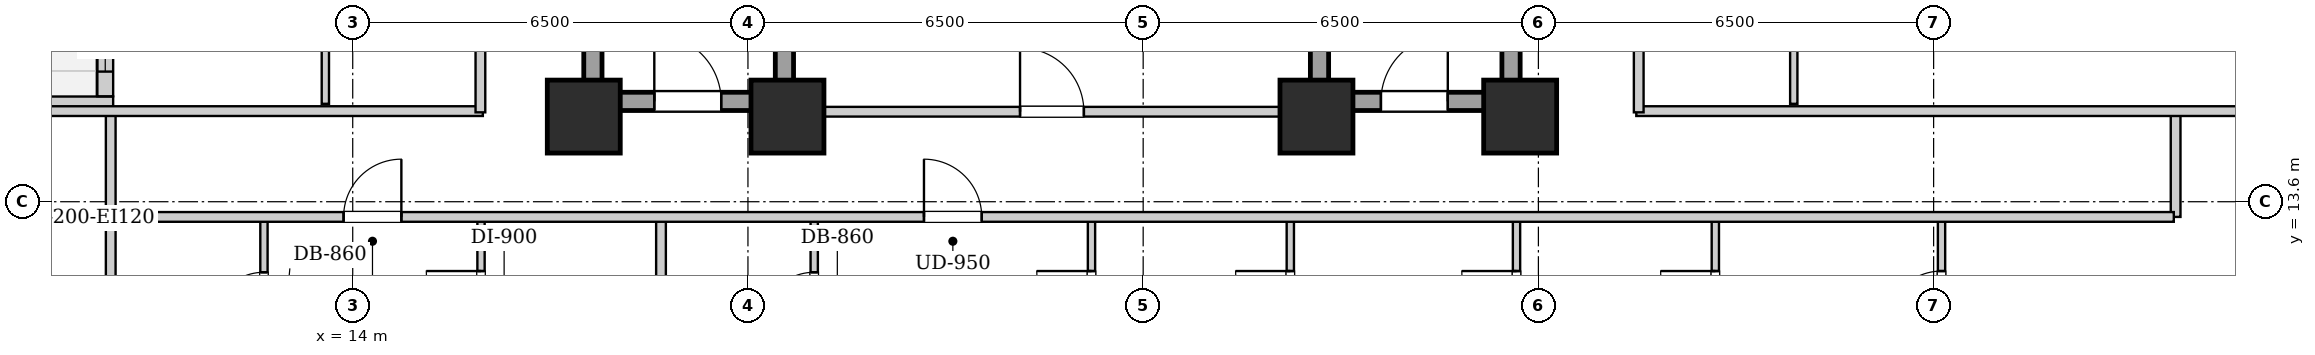
"""IFC4 building model, lengths in metres.
Left out: names, types, materials, properties, quantities, classifications, styles, units other than length and angle.
Written with IfcOpenShell. Run it as: python <this file> out.ifc"""

import sys

from ifc_helpers import new_model, si_unit, direction, frame, frame_2d, origin, origin_2d, place, context, subcontext, project, spatial, rectangle, extrude, element, fill, save


model = new_model("IFC4")
c1 = context("Model", 3, precision=1e-05, world=origin(), true_north=direction((0.0, 1.0)))
c2 = subcontext(c1, "Body", "Model", "MODEL_VIEW")
j1 = project(units=[si_unit("LENGTHUNIT", "METRE"), si_unit("PLANEANGLEUNIT", "RADIAN")], contexts=[c1])
p1 = place(None, origin())
s1 = spatial("IfcSite", under=j1, at=p1, CompositionType="ELEMENT")
p2 = place(p1, origin())
s2 = spatial("IfcBuilding", under=s1, at=p2, CompositionType="ELEMENT")
p3 = place(p2, frame((0.0, 0.0, 45.0)))
s3 = spatial("IfcBuildingStorey", under=s2, at=p3, CompositionType="ELEMENT", Elevation=45.0)
for number, where, z_axis, x_axis in (
    (1, (17.8, 15.0, 0.0), (0.0, 0.0, 1.0), (1.0, 0.0, 0.0)),
    (2, (21.15, 15.0, 0.0), (0.0, 0.0, 1.0), (1.0, 0.0, 0.0)),
    (3, (29.85, 15.0, 0.0), (0.0, 0.0, 1.0), (1.0, 0.0, 0.0)),
    (4, (33.2, 15.0, 0.0), (0.0, 0.0, 1.0), (1.0, 0.0, 0.0)),
):
    element("IfcColumn", number, at=place(p3, frame(where, z_axis=z_axis, x_axis=x_axis)), inside=s3, PredefinedType="COLUMN", context=c2, shape_type="SweptSolid", body=[
        extrude(rectangle(XDim=1.2, YDim=1.2, at=origin_2d()), origin(), (0.0, 0.0, 1.0), 3.2),
    ])
p4 = place(p3, frame((7.66, 15.2, 0.0), z_axis=(0.0, 0.0, 1.0), x_axis=(1.0, 0.0, 0.0)))
e5 = element("IfcWall", 5, at=p4, inside=s3, PredefinedType="SOLIDWALL", context=c2, shape_type="SweptSolid", body=[
    extrude(rectangle(XDim=2.4, YDim=0.26, at=frame_2d((1.2, 0.0))), origin(), (0.0, 0.0, 1.0), 2.94),
])
p5 = place(p3, frame((9.93, 15.334, 0.0), z_axis=(0.0, 0.0, 1.0), x_axis=(0.0, 1.0, 0.0)))
e6 = element("IfcWall", 6, at=p5, inside=s3, PredefinedType="SOLIDWALL", context=c2, shape_type="SweptSolid", body=[
    extrude(rectangle(XDim=3.932, YDim=0.26, at=frame_2d((1.966, 0.0))), origin(), (0.0, 0.0, 1.0), 2.94),
])
p6 = place(p5, frame((1.416, 0.0, 0.0)))
e7 = element("IfcOpeningElement", 7, at=p6, cuts=e6, PredefinedType="OPENING", context=c2, shape_type="SweptSolid", body=[
    extrude(rectangle(XDim=1.1, YDim=2.0, at=frame_2d((0.55, 1.0))), frame((0.0, 0.14, 0.0), z_axis=(0.0, -1.0, 0.0), x_axis=(1.0, 0.0, 0.0)), (0.0, 0.0, 1.0), 0.28),
])
p7 = place(p5, frame((0.406, 0.0, 0.55)))
e8 = element("IfcOpeningElement", 8, at=p7, cuts=e6, PredefinedType="OPENING", context=c2, shape_type="SweptSolid", body=[
    extrude(rectangle(XDim=0.85, YDim=1.2, at=frame_2d((0.425, 0.6))), frame((0.0, 0.14, 0.0), z_axis=(0.0, -1.0, 0.0), x_axis=(1.0, 0.0, 0.0)), (0.0, 0.0, 1.0), 0.28),
])
for number, where, z_axis, x_axis in (
    (9, (17.95, 15.1, 0.0), (0.0, 0.0, 1.0), (0.0, 1.0, 0.0)),
    (10, (21.1, 15.1, 0.0), (0.0, 0.0, 1.0), (0.0, 1.0, 0.0)),
):
    element("IfcWall", number, at=place(p3, frame(where, z_axis=z_axis, x_axis=x_axis)), inside=s3, PredefinedType="SHEAR", context=c2, shape_type="SweptSolid", body=[
        extrude(rectangle(XDim=9.0, YDim=0.3, at=frame_2d((4.5, 0.0))), origin(), (0.0, 0.0, 1.0), 2.94),
    ])
p8 = place(p3, frame((18.1, 15.25, 0.0), z_axis=(0.0, 0.0, 1.0), x_axis=(1.0, 0.0, 0.0)))
e11 = element("IfcWall", 11, at=p8, inside=s3, PredefinedType="SHEAR", context=c2, shape_type="SweptSolid", body=[
    extrude(rectangle(XDim=2.85, YDim=0.3, at=frame_2d((1.425, 0.0))), origin(), (0.0, 0.0, 1.0), 2.94),
])
p9 = place(p8, frame((0.86, 0.0, 0.0)))
e12 = element("IfcOpeningElement", 12, at=p9, cuts=e11, PredefinedType="OPENING", context=c2, shape_type="SweptSolid", body=[
    extrude(rectangle(XDim=1.1, YDim=2.05, at=frame_2d((0.55, 1.025))), frame((0.0, 0.16, 0.0), z_axis=(0.0, -1.0, 0.0), x_axis=(1.0, 0.0, 0.0)), (0.0, 0.0, 1.0), 0.32),
])
for number, where, z_axis, x_axis in (
    (13, (29.9, 15.1, 0.0), (0.0, 0.0, 1.0), (0.0, 1.0, 0.0)),
    (14, (33.05, 15.1, 0.0), (0.0, 0.0, 1.0), (0.0, 1.0, 0.0)),
):
    element("IfcWall", number, at=place(p3, frame(where, z_axis=z_axis, x_axis=x_axis)), inside=s3, PredefinedType="SHEAR", context=c2, shape_type="SweptSolid", body=[
        extrude(rectangle(XDim=9.0, YDim=0.3, at=frame_2d((4.5, 0.0))), origin(), (0.0, 0.0, 1.0), 2.94),
    ])
p10 = place(p3, frame((30.05, 15.25, 0.0), z_axis=(0.0, 0.0, 1.0), x_axis=(1.0, 0.0, 0.0)))
e15 = element("IfcWall", 15, at=p10, inside=s3, PredefinedType="SHEAR", context=c2, shape_type="SweptSolid", body=[
    extrude(rectangle(XDim=2.85, YDim=0.3, at=frame_2d((1.425, 0.0))), origin(), (0.0, 0.0, 1.0), 2.94),
])
p11 = place(p10, frame((0.86, 0.0, 0.0)))
e16 = element("IfcOpeningElement", 16, at=p11, cuts=e15, PredefinedType="OPENING", context=c2, shape_type="SweptSolid", body=[
    extrude(rectangle(XDim=1.1, YDim=2.05, at=frame_2d((0.55, 1.025))), frame((0.0, 0.16, 0.0), z_axis=(0.0, -1.0, 0.0), x_axis=(1.0, 0.0, 0.0)), (0.0, 0.0, 1.0), 0.32),
])
p12 = place(p3, frame((21.25, 15.08, 0.0), z_axis=(0.0, 0.0, 1.0), x_axis=(1.0, 0.0, 0.0)))
e17 = element("IfcWall", 17, at=p12, inside=s3, PredefinedType="PARTITIONING", context=c2, shape_type="SweptSolid", body=[
    extrude(rectangle(XDim=8.5, YDim=0.16, at=frame_2d((4.25, 0.0))), origin(), (0.0, 0.0, 1.0), 2.155),
])
p13 = place(p12, frame((3.725, 0.0, 0.0)))
e18 = element("IfcOpeningElement", 18, at=p13, cuts=e17, PredefinedType="OPENING", context=c2, shape_type="SweptSolid", body=[
    extrude(rectangle(XDim=1.05, YDim=2.05, at=frame_2d((0.525, 1.025))), frame((0.0, 0.09, 0.0), z_axis=(0.0, -1.0, 0.0), x_axis=(1.0, 0.0, 0.0)), (0.0, 0.0, 1.0), 0.18),
])
for number, where, z_axis, x_axis in (
    (19, (10.02, 13.35, 0.0), (0.0, 0.0, 1.0), (0.0, 1.0, 0.0)),
    (20, (43.98, 13.35, 0.0), (0.0, 0.0, 1.0), (0.0, 1.0, 0.0)),
):
    element("IfcWall", number, at=place(p3, frame(where, z_axis=z_axis, x_axis=x_axis)), inside=s3, PredefinedType="PARTITIONING", context=c2, shape_type="SweptSolid", body=[
        extrude(rectangle(XDim=1.74, YDim=0.16, at=frame_2d((0.87, 0.0))), origin(), (0.0, 0.0, 1.0), 2.94),
    ])
p14 = place(p3, frame((7.78, 15.09, 0.0), z_axis=(0.0, 0.0, 1.0), x_axis=(1.0, 0.0, 0.0)))
e21 = element("IfcWall", 21, at=p14, inside=s3, PredefinedType="PARTITIONING", context=c2, shape_type="SweptSolid", body=[
    extrude(rectangle(XDim=8.36, YDim=0.16, at=frame_2d((4.18, 0.0))), origin(), (0.0, 0.0, 1.0), 2.155),
])
p15 = place(p3, frame((35.11, 15.09, 0.0), z_axis=(0.0, 0.0, 1.0), x_axis=(1.0, 0.0, 0.0)))
e22 = element("IfcWall", 22, at=p15, inside=s3, PredefinedType="PARTITIONING", context=c2, shape_type="SweptSolid", body=[
    extrude(rectangle(XDim=11.11, YDim=0.16, at=frame_2d((5.555, 0.0))), origin(), (0.0, 0.0, 1.0), 2.155),
])
p16 = place(p3, frame((10.02, 10.65, 0.0), z_axis=(0.0, 0.0, 1.0), x_axis=(0.0, 1.0, 0.0)))
e23 = element("IfcWall", 23, at=p16, inside=s3, PredefinedType="PARTITIONING", context=c2, shape_type="SweptSolid", body=[
    extrude(rectangle(XDim=2.66, YDim=0.16, at=frame_2d((1.33, 0.0))), origin(), (0.0, 0.0, 1.0), 2.94),
])
p17 = place(p3, frame((12.54, 10.71, 0.0), z_axis=(0.0, 0.0, 1.0), x_axis=(0.0, 1.0, 0.0)))
e24 = element("IfcWall", 24, at=p17, inside=s3, PredefinedType="PARTITIONING", context=c2, shape_type="SweptSolid", body=[
    extrude(rectangle(XDim=2.6, YDim=0.12, at=frame_2d((1.3, 0.0))), origin(), (0.0, 0.0, 1.0), 2.94),
])
p18 = place(p17, frame((0.87, 0.0, 0.0)))
e25 = element("IfcOpeningElement", 25, at=p18, cuts=e24, PredefinedType="OPENING", context=c2, shape_type="SweptSolid", body=[
    extrude(rectangle(XDim=0.86, YDim=2.05, at=frame_2d((0.43, 1.025))), frame((0.0, 0.07, 0.0), z_axis=(0.0, -1.0, 0.0), x_axis=(1.0, 0.0, 0.0)), (0.0, 0.0, 1.0), 0.14),
])
p19 = place(p3, frame((16.11, 10.71, 0.0), z_axis=(0.0, 0.0, 1.0), x_axis=(0.0, 1.0, 0.0)))
e26 = element("IfcWall", 26, at=p19, inside=s3, PredefinedType="PARTITIONING", context=c2, shape_type="SweptSolid", body=[
    extrude(rectangle(XDim=2.6, YDim=0.12, at=frame_2d((1.3, 0.0))), origin(), (0.0, 0.0, 1.0), 2.94),
])
p20 = place(p19, frame((0.85, 0.0, 0.0)))
e27 = element("IfcOpeningElement", 27, at=p20, cuts=e26, PredefinedType="OPENING", context=c2, shape_type="SweptSolid", body=[
    extrude(rectangle(XDim=0.9, YDim=2.05, at=frame_2d((0.45, 1.025))), frame((0.0, 0.07, 0.0), z_axis=(0.0, -1.0, 0.0), x_axis=(1.0, 0.0, 0.0)), (0.0, 0.0, 1.0), 0.14),
])
p21 = place(p3, frame((19.07, 0.28, 0.0), z_axis=(0.0, 0.0, 1.0), x_axis=(0.0, 1.0, 0.0)))
e28 = element("IfcWall", 28, at=p21, inside=s3, PredefinedType="PARTITIONING", context=c2, shape_type="SweptSolid", body=[
    extrude(rectangle(XDim=13.03, YDim=0.16, at=frame_2d((6.515, 0.0))), origin(), (0.0, 0.0, 1.0), 2.94),
])
p22 = place(p3, frame((21.59, 10.71, 0.0), z_axis=(0.0, 0.0, 1.0), x_axis=(0.0, 1.0, 0.0)))
e29 = element("IfcWall", 29, at=p22, inside=s3, PredefinedType="PARTITIONING", context=c2, shape_type="SweptSolid", body=[
    extrude(rectangle(XDim=2.6, YDim=0.12, at=frame_2d((1.3, 0.0))), origin(), (0.0, 0.0, 1.0), 2.94),
])
p23 = place(p22, frame((0.87, 0.0, 0.0)))
e30 = element("IfcOpeningElement", 30, at=p23, cuts=e29, PredefinedType="OPENING", context=c2, shape_type="SweptSolid", body=[
    extrude(rectangle(XDim=0.86, YDim=2.05, at=frame_2d((0.43, 1.025))), frame((0.0, 0.07, 0.0), z_axis=(0.0, -1.0, 0.0), x_axis=(1.0, 0.0, 0.0)), (0.0, 0.0, 1.0), 0.14),
])
p24 = place(p3, frame((26.15, 10.71, 0.0), z_axis=(0.0, 0.0, 1.0), x_axis=(0.0, 1.0, 0.0)))
e31 = element("IfcWall", 31, at=p24, inside=s3, PredefinedType="PARTITIONING", context=c2, shape_type="SweptSolid", body=[
    extrude(rectangle(XDim=2.6, YDim=0.12, at=frame_2d((1.3, 0.0))), origin(), (0.0, 0.0, 1.0), 2.94),
])
p25 = place(p24, frame((0.85, 0.0, 0.0)))
e32 = element("IfcOpeningElement", 32, at=p25, cuts=e31, PredefinedType="OPENING", context=c2, shape_type="SweptSolid", body=[
    extrude(rectangle(XDim=0.9, YDim=2.05, at=frame_2d((0.45, 1.025))), frame((0.0, 0.07, 0.0), z_axis=(0.0, -1.0, 0.0), x_axis=(1.0, 0.0, 0.0)), (0.0, 0.0, 1.0), 0.14),
])
p26 = place(p3, frame((29.42, 10.71, 0.0), z_axis=(0.0, 0.0, 1.0), x_axis=(0.0, 1.0, 0.0)))
e33 = element("IfcWall", 33, at=p26, inside=s3, PredefinedType="PARTITIONING", context=c2, shape_type="SweptSolid", body=[
    extrude(rectangle(XDim=2.6, YDim=0.12, at=frame_2d((1.3, 0.0))), origin(), (0.0, 0.0, 1.0), 2.94),
])
p27 = place(p26, frame((0.85, 0.0, 0.0)))
e34 = element("IfcOpeningElement", 34, at=p27, cuts=e33, PredefinedType="OPENING", context=c2, shape_type="SweptSolid", body=[
    extrude(rectangle(XDim=0.9, YDim=2.05, at=frame_2d((0.45, 1.025))), frame((0.0, 0.07, 0.0), z_axis=(0.0, -1.0, 0.0), x_axis=(1.0, 0.0, 0.0)), (0.0, 0.0, 1.0), 0.14),
])
p28 = place(p3, frame((33.14, 10.71, 0.0), z_axis=(0.0, 0.0, 1.0), x_axis=(0.0, 1.0, 0.0)))
e35 = element("IfcWall", 35, at=p28, inside=s3, PredefinedType="PARTITIONING", context=c2, shape_type="SweptSolid", body=[
    extrude(rectangle(XDim=2.6, YDim=0.12, at=frame_2d((1.3, 0.0))), origin(), (0.0, 0.0, 1.0), 2.155),
])
p29 = place(p28, frame((0.85, 0.0, 0.0)))
e36 = element("IfcOpeningElement", 36, at=p29, cuts=e35, PredefinedType="OPENING", context=c2, shape_type="SweptSolid", body=[
    extrude(rectangle(XDim=0.9, YDim=2.05, at=frame_2d((0.45, 1.025))), frame((0.0, 0.07, 0.0), z_axis=(0.0, -1.0, 0.0), x_axis=(1.0, 0.0, 0.0)), (0.0, 0.0, 1.0), 0.14),
])
p30 = place(p3, frame((36.41, 10.71, 0.0), z_axis=(0.0, 0.0, 1.0), x_axis=(0.0, 1.0, 0.0)))
e37 = element("IfcWall", 37, at=p30, inside=s3, PredefinedType="PARTITIONING", context=c2, shape_type="SweptSolid", body=[
    extrude(rectangle(XDim=2.6, YDim=0.12, at=frame_2d((1.3, 0.0))), origin(), (0.0, 0.0, 1.0), 2.94),
])
p31 = place(p30, frame((0.85, 0.0, 0.0)))
e38 = element("IfcOpeningElement", 38, at=p31, cuts=e37, PredefinedType="OPENING", context=c2, shape_type="SweptSolid", body=[
    extrude(rectangle(XDim=0.9, YDim=2.05, at=frame_2d((0.45, 1.025))), frame((0.0, 0.07, 0.0), z_axis=(0.0, -1.0, 0.0), x_axis=(1.0, 0.0, 0.0)), (0.0, 0.0, 1.0), 0.14),
])
p32 = place(p3, frame((40.13, 10.71, 0.0), z_axis=(0.0, 0.0, 1.0), x_axis=(0.0, 1.0, 0.0)))
e39 = element("IfcWall", 39, at=p32, inside=s3, PredefinedType="PARTITIONING", context=c2, shape_type="SweptSolid", body=[
    extrude(rectangle(XDim=2.6, YDim=0.12, at=frame_2d((1.3, 0.0))), origin(), (0.0, 0.0, 1.0), 2.94),
])
p33 = place(p32, frame((0.85, 0.0, 0.0)))
e40 = element("IfcOpeningElement", 40, at=p33, cuts=e39, PredefinedType="OPENING", context=c2, shape_type="SweptSolid", body=[
    extrude(rectangle(XDim=0.9, YDim=2.05, at=frame_2d((0.45, 1.025))), frame((0.0, 0.07, 0.0), z_axis=(0.0, -1.0, 0.0), x_axis=(1.0, 0.0, 0.0)), (0.0, 0.0, 1.0), 0.14),
])
p34 = place(p3, frame((13.55, 15.21, 0.0), z_axis=(0.0, 0.0, 1.0), x_axis=(0.0, 1.0, 0.0)))
e41 = element("IfcWall", 41, at=p34, inside=s3, PredefinedType="PARTITIONING", context=c2, shape_type="SweptSolid", body=[
    extrude(rectangle(XDim=1.85, YDim=0.12, at=frame_2d((0.925, 0.0))), origin(), (0.0, 0.0, 1.0), 2.94),
])
p35 = place(p3, frame((37.7, 15.21, 0.0), z_axis=(0.0, 0.0, 1.0), x_axis=(0.0, 1.0, 0.0)))
e42 = element("IfcWall", 42, at=p35, inside=s3, PredefinedType="PARTITIONING", context=c2, shape_type="SweptSolid", body=[
    extrude(rectangle(XDim=2.3, YDim=0.12, at=frame_2d((1.15, 0.0))), origin(), (0.0, 0.0, 1.0), 2.94),
])
p36 = place(p3, frame((10.05, 13.35, 0.0), z_axis=(0.0, 0.0, 1.0), x_axis=(1.0, 0.0, 0.0)))
e43 = element("IfcWall", 43, at=p36, inside=s3, PredefinedType="PARTITIONING", context=c2, shape_type="SweptSolid", body=[
    extrude(rectangle(XDim=33.9, YDim=0.16, at=frame_2d((16.95, 0.0))), origin(), (0.0, 0.0, 1.0), 2.94),
])
p37 = place(p36, frame((3.8, 0.0, 0.0)))
e44 = element("IfcOpeningElement", 44, at=p37, cuts=e43, PredefinedType="OPENING", context=c2, shape_type="SweptSolid", body=[
    extrude(rectangle(XDim=0.95, YDim=2.1, at=frame_2d((0.475, 1.05))), frame((0.0, 0.09, 0.0), z_axis=(0.0, -1.0, 0.0), x_axis=(1.0, 0.0, 0.0)), (0.0, 0.0, 1.0), 0.18),
])
p38 = place(p36, frame((13.345, 0.0, 0.0)))
e45 = element("IfcOpeningElement", 45, at=p38, cuts=e43, PredefinedType="OPENING", context=c2, shape_type="SweptSolid", body=[
    extrude(rectangle(XDim=0.95, YDim=2.1, at=frame_2d((0.475, 1.05))), frame((0.0, 0.09, 0.0), z_axis=(0.0, -1.0, 0.0), x_axis=(1.0, 0.0, 0.0)), (0.0, 0.0, 1.0), 0.18),
])
p39 = place(p3, frame((16.1, 15.07, 0.0), z_axis=(0.0, 0.0, 1.0), x_axis=(0.0, 1.0, 0.0)))
e46 = element("IfcWall", 46, at=p39, inside=s3, PredefinedType="PARTITIONING", context=c2, shape_type="SweptSolid", body=[
    extrude(rectangle(XDim=13.93, YDim=0.16, at=frame_2d((6.965, 0.0))), origin(), (0.0, 0.0, 1.0), 2.94),
])
p40 = place(p39, frame((3.608, 0.0, 0.0)))
e47 = element("IfcOpeningElement", 47, at=p40, cuts=e46, PredefinedType="OPENING", context=c2, shape_type="SweptSolid", body=[
    extrude(rectangle(XDim=0.95, YDim=2.1, at=frame_2d((0.475, 1.05))), frame((0.0, 0.09, 0.0), z_axis=(0.0, -1.0, 0.0), x_axis=(1.0, 0.0, 0.0)), (0.0, 0.0, 1.0), 0.18),
])
p41 = place(p39, frame((10.649, 0.0, 0.0)))
e48 = element("IfcOpeningElement", 48, at=p41, cuts=e46, PredefinedType="OPENING", context=c2, shape_type="SweptSolid", body=[
    extrude(rectangle(XDim=0.95, YDim=2.1, at=frame_2d((0.475, 1.05))), frame((0.0, 0.09, 0.0), z_axis=(0.0, -1.0, 0.0), x_axis=(1.0, 0.0, 0.0)), (0.0, 0.0, 1.0), 0.18),
])
p42 = place(p3, frame((35.15, 15.07, 0.0), z_axis=(0.0, 0.0, 1.0), x_axis=(0.0, 1.0, 0.0)))
e49 = element("IfcWall", 49, at=p42, inside=s3, PredefinedType="PARTITIONING", context=c2, shape_type="SweptSolid", body=[
    extrude(rectangle(XDim=13.93, YDim=0.16, at=frame_2d((6.965, 0.0))), origin(), (0.0, 0.0, 1.0), 2.94),
])
p43 = place(p42, frame((4.385, 0.0, 0.0)))
e50 = element("IfcOpeningElement", 50, at=p43, cuts=e49, PredefinedType="OPENING", context=c2, shape_type="SweptSolid", body=[
    extrude(rectangle(XDim=0.95, YDim=2.1, at=frame_2d((0.475, 1.05))), frame((0.0, 0.09, 0.0), z_axis=(0.0, -1.0, 0.0), x_axis=(1.0, 0.0, 0.0)), (0.0, 0.0, 1.0), 0.18),
])
p44 = place(p9, origin())
e51 = element("IfcDoor", 51, at=p44, inside=s3, OperationType="SINGLE_SWING_LEFT", PredefinedType="DOOR", context=c2, shape_type="SweptSolid", body=[
    extrude(rectangle(XDim=1.1, YDim=2.05, at=frame_2d((0.55, 1.025))), frame((0.0, 0.025, 0.0), z_axis=(0.0, -1.0, 0.0), x_axis=(1.0, 0.0, 0.0)), (0.0, 0.0, 1.0), 0.05),
])
fill(e12, e51)
p45 = place(p11, origin())
e52 = element("IfcDoor", 52, at=p45, inside=s3, OperationType="SINGLE_SWING_RIGHT", PredefinedType="DOOR", context=c2, shape_type="SweptSolid", body=[
    extrude(rectangle(XDim=1.1, YDim=2.05, at=frame_2d((0.55, 1.025))), frame((0.0, 0.025, 0.0), z_axis=(0.0, -1.0, 0.0), x_axis=(1.0, 0.0, 0.0)), (0.0, 0.0, 1.0), 0.05),
])
fill(e16, e52)
p46 = place(p13, origin())
e53 = element("IfcDoor", 53, at=p46, inside=s3, OperationType="SINGLE_SWING_LEFT", PredefinedType="DOOR", context=c2, shape_type="SweptSolid", body=[
    extrude(rectangle(XDim=1.05, YDim=2.05, at=frame_2d((0.525, 1.025))), frame((0.0, 0.025, 0.0), z_axis=(0.0, -1.0, 0.0), x_axis=(1.0, 0.0, 0.0)), (0.0, 0.0, 1.0), 0.05),
])
fill(e18, e53)
p47 = place(p18, origin())
e54 = element("IfcDoor", 54, at=p47, inside=s3, OperationType="SINGLE_SWING_LEFT", PredefinedType="DOOR", context=c2, shape_type="SweptSolid", body=[
    extrude(rectangle(XDim=0.86, YDim=2.05, at=frame_2d((0.43, 1.025))), frame((0.0, 0.025, 0.0), z_axis=(0.0, -1.0, 0.0), x_axis=(1.0, 0.0, 0.0)), (0.0, 0.0, 1.0), 0.05),
])
fill(e25, e54)
p48 = place(p20, origin())
e55 = element("IfcDoor", 55, at=p48, inside=s3, OperationType="SINGLE_SWING_RIGHT", PredefinedType="DOOR", context=c2, shape_type="SweptSolid", body=[
    extrude(rectangle(XDim=0.9, YDim=2.05, at=frame_2d((0.45, 1.025))), frame((0.0, 0.025, 0.0), z_axis=(0.0, -1.0, 0.0), x_axis=(1.0, 0.0, 0.0)), (0.0, 0.0, 1.0), 0.05),
])
fill(e27, e55)
p49 = place(p23, origin())
e56 = element("IfcDoor", 56, at=p49, inside=s3, OperationType="SINGLE_SWING_LEFT", PredefinedType="DOOR", context=c2, shape_type="SweptSolid", body=[
    extrude(rectangle(XDim=0.86, YDim=2.05, at=frame_2d((0.43, 1.025))), frame((0.0, 0.025, 0.0), z_axis=(0.0, -1.0, 0.0), x_axis=(1.0, 0.0, 0.0)), (0.0, 0.0, 1.0), 0.05),
])
fill(e30, e56)
p50 = place(p25, origin())
e57 = element("IfcDoor", 57, at=p50, inside=s3, OperationType="SINGLE_SWING_RIGHT", PredefinedType="DOOR", context=c2, shape_type="SweptSolid", body=[
    extrude(rectangle(XDim=0.9, YDim=2.05, at=frame_2d((0.45, 1.025))), frame((0.0, 0.025, 0.0), z_axis=(0.0, -1.0, 0.0), x_axis=(1.0, 0.0, 0.0)), (0.0, 0.0, 1.0), 0.05),
])
fill(e32, e57)
p51 = place(p27, origin())
e58 = element("IfcDoor", 58, at=p51, inside=s3, OperationType="SINGLE_SWING_RIGHT", PredefinedType="DOOR", context=c2, shape_type="SweptSolid", body=[
    extrude(rectangle(XDim=0.9, YDim=2.05, at=frame_2d((0.45, 1.025))), frame((0.0, 0.025, 0.0), z_axis=(0.0, -1.0, 0.0), x_axis=(1.0, 0.0, 0.0)), (0.0, 0.0, 1.0), 0.05),
])
fill(e34, e58)
p52 = place(p29, origin())
e59 = element("IfcDoor", 59, at=p52, inside=s3, OperationType="SINGLE_SWING_RIGHT", PredefinedType="DOOR", context=c2, shape_type="SweptSolid", body=[
    extrude(rectangle(XDim=0.9, YDim=2.05, at=frame_2d((0.45, 1.025))), frame((0.0, 0.025, 0.0), z_axis=(0.0, -1.0, 0.0), x_axis=(1.0, 0.0, 0.0)), (0.0, 0.0, 1.0), 0.05),
])
fill(e36, e59)
p53 = place(p31, origin())
e60 = element("IfcDoor", 60, at=p53, inside=s3, OperationType="SINGLE_SWING_RIGHT", PredefinedType="DOOR", context=c2, shape_type="SweptSolid", body=[
    extrude(rectangle(XDim=0.9, YDim=2.05, at=frame_2d((0.45, 1.025))), frame((0.0, 0.025, 0.0), z_axis=(0.0, -1.0, 0.0), x_axis=(1.0, 0.0, 0.0)), (0.0, 0.0, 1.0), 0.05),
])
fill(e38, e60)
p54 = place(p33, origin())
e61 = element("IfcDoor", 61, at=p54, inside=s3, OperationType="SINGLE_SWING_LEFT", PredefinedType="DOOR", context=c2, shape_type="SweptSolid", body=[
    extrude(rectangle(XDim=0.9, YDim=2.05, at=frame_2d((0.45, 1.025))), frame((0.0, 0.025, 0.0), z_axis=(0.0, -1.0, 0.0), x_axis=(1.0, 0.0, 0.0)), (0.0, 0.0, 1.0), 0.05),
])
fill(e40, e61)
p55 = place(p37, origin())
e62 = element("IfcDoor", 62, at=p55, inside=s3, OperationType="SINGLE_SWING_RIGHT", PredefinedType="DOOR", context=c2, shape_type="SweptSolid", body=[
    extrude(rectangle(XDim=0.95, YDim=2.1, at=frame_2d((0.475, 1.05))), frame((0.0, 0.025, 0.0), z_axis=(0.0, -1.0, 0.0), x_axis=(1.0, 0.0, 0.0)), (0.0, 0.0, 1.0), 0.05),
])
fill(e44, e62)
p56 = place(p38, origin())
e63 = element("IfcDoor", 63, at=p56, inside=s3, OperationType="SINGLE_SWING_LEFT", PredefinedType="DOOR", context=c2, shape_type="SweptSolid", body=[
    extrude(rectangle(XDim=0.95, YDim=2.1, at=frame_2d((0.475, 1.05))), frame((0.0, 0.025, 0.0), z_axis=(0.0, -1.0, 0.0), x_axis=(1.0, 0.0, 0.0)), (0.0, 0.0, 1.0), 0.05),
])
fill(e45, e63)
p57 = place(p7, origin())
e64 = element("IfcWindow", 64, at=p57, inside=s3, PartitioningType="SINGLE_PANEL", PredefinedType="WINDOW", context=c2, shape_type="SweptSolid", body=[
    extrude(rectangle(XDim=0.85, YDim=1.2, at=frame_2d((0.425, 0.6))), frame((0.0, 0.03, 0.0), z_axis=(0.0, -1.0, 0.0), x_axis=(1.0, 0.0, 0.0)), (0.0, 0.0, 1.0), 0.06),
])
fill(e8, e64)
save(model, sys.argv[1])
